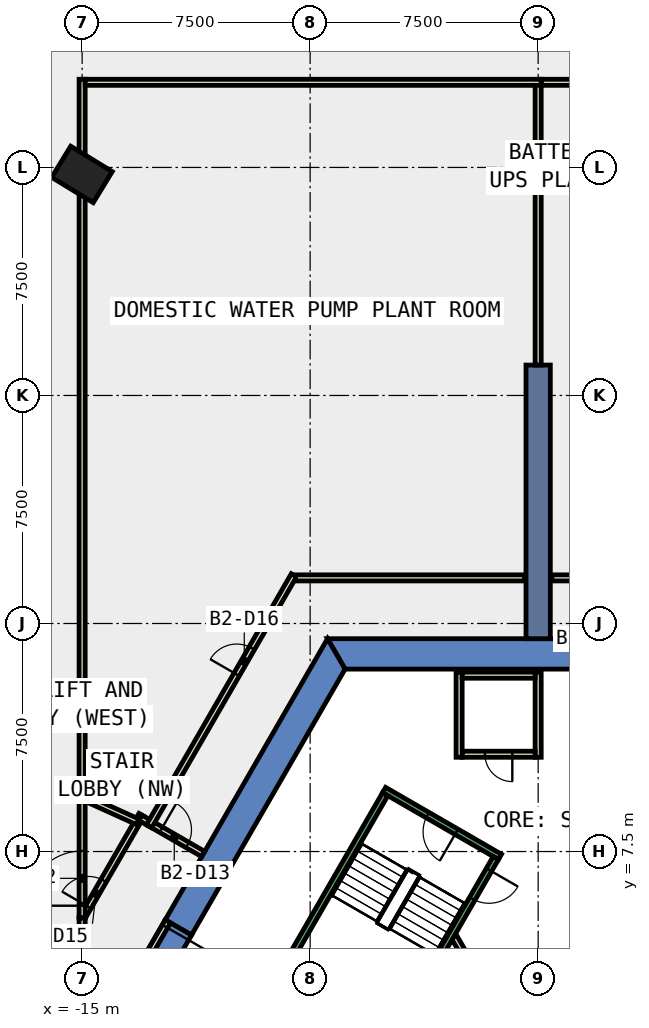
"""IFC4 building model, lengths in metres.
Left out: names, types, materials, properties, quantities, classifications, styles, units other than length and angle.
Written with IfcOpenShell. Run it as: python <this file> out.ifc"""

import sys

from ifc_helpers import new_model, si_unit, direction, frame, frame_2d, origin, origin_2d, place, context, subcontext, project, spatial, polyline, rectangle, outline, extrude, element, fill, save


model = new_model("IFC4")
c1 = context("Model", 3, precision=1e-05, world=origin(), true_north=direction((0.0, 1.0)))
c2 = subcontext(c1, "Body", "Model", "MODEL_VIEW")
j1 = project(units=[si_unit("LENGTHUNIT", "METRE"), si_unit("PLANEANGLEUNIT", "RADIAN")], contexts=[c1])
p1 = place(None, origin())
s1 = spatial("IfcSite", under=j1, at=p1, CompositionType="ELEMENT")
p2 = place(p1, origin())
s2 = spatial("IfcBuilding", under=s1, at=p2, CompositionType="ELEMENT")
p3 = place(p2, frame((0.0, 0.0, -11.0)))
s3 = spatial("IfcBuildingStorey", under=s2, at=p3, CompositionType="ELEMENT", Elevation=-11.0)
p4 = place(p3, frame((-15.005, 29.769, -0.42), z_axis=(0.0, 0.0, 1.0), x_axis=(0.521545830745, 0.853223268806, 0.0)))
e1 = element("IfcColumn", 1, at=p4, inside=s3, PredefinedType="COLUMN", context=c2, shape_type="SweptSolid", body=[
    extrude(rectangle(XDim=1.2, YDim=1.6, at=origin_2d()), origin(), (0.0, 0.0, 1.0), 5.5),
])
p5 = place(p3, frame((0.0, 0.0, -0.42)))
e2 = element("IfcWall", 2, at=p5, inside=s3, PredefinedType="SHEAR", context=c2, shape_type="SweptSolid", body=[
    extrude(outline(polyline([(6.928, 14.5), (-6.928, 14.5), (-6.351, 13.5), (6.351, 13.5), (6.928, 14.5)])), origin(), (0.0, 0.0, 1.0), 5.5),
])
p6 = place(p3, frame((0.0, 0.0, -0.42)))
e3 = element("IfcWall", 3, at=p6, inside=s3, PredefinedType="SHEAR", context=c2, shape_type="SweptSolid", body=[
    extrude(outline(polyline([(-12.267, 5.252), (-11.402, 4.752), (-6.351, 13.5), (-6.928, 14.5), (-12.267, 5.252)])), origin(), (0.0, 0.0, 1.0), 5.5),
])
p7 = place(p3, frame((0.0, 0.0, 3.6)))
e4 = element("IfcWall", 4, at=p7, inside=s3, PredefinedType="SHEAR", context=c2, shape_type="SweptSolid", body=[
    extrude(outline(polyline([(-13.267, 3.52), (-12.402, 3.02), (-11.402, 4.752), (-12.267, 5.252), (-13.267, 3.52)])), origin(), (0.0, 0.0, 1.0), 1.48),
])
p8 = place(p3, frame((0.0, 14.5, -0.42), z_axis=(0.0, 0.0, 1.0), x_axis=(0.0, 1.0, 0.0)))
e5 = element("IfcWall", 5, at=p8, inside=s3, PredefinedType="SHEAR", context=c2, shape_type="SweptSolid", body=[
    extrude(rectangle(XDim=9.0, YDim=0.8, at=frame_2d((4.5, 0.0))), origin(), (0.0, 0.0, 1.0), 5.5),
])
p9 = place(p3, frame((0.45, 16.5, 0.0), z_axis=(0.0, 0.0, 1.0), x_axis=(1.0, 0.0, 0.0)))
e6 = element("IfcWall", 6, at=p9, inside=s3, PredefinedType="PARTITIONING", context=c2, shape_type="SweptSolid", body=[
    extrude(rectangle(XDim=2.222, YDim=0.2, at=frame_2d((1.111, 0.0))), origin(), (0.0, 0.0, 1.0), 5.05),
])
p10 = place(p9, frame((0.792, 0.0, 0.0)))
e7 = element("IfcOpeningElement", 7, at=p10, cuts=e6, PredefinedType="OPENING", context=c2, shape_type="SweptSolid", body=[
    extrude(rectangle(XDim=1.0, YDim=2.1, at=frame_2d((0.5, 1.05))), frame((0.0, 0.11, 0.0), z_axis=(0.0, -1.0, 0.0), x_axis=(1.0, 0.0, 0.0)), (0.0, 0.0, 1.0), 0.22),
])
p11 = place(p3, frame((0.0, 23.5, 0.0), z_axis=(0.0, 0.0, 1.0), x_axis=(0.0, 1.0, 0.0)))
e8 = element("IfcWall", 8, at=p11, inside=s3, PredefinedType="PARTITIONING", context=c2, shape_type="SweptSolid", body=[
    extrude(rectangle(XDim=9.3, YDim=0.2, at=frame_2d((4.65, 0.0))), origin(), (0.0, 0.0, 1.0), 5.05),
])
p12 = place(p3, frame((0.1, 32.8, 0.0), z_axis=(0.0, 0.0, 1.0), x_axis=(1.0, 0.0, 0.0)))
e9 = element("IfcWall", 9, at=p12, inside=s3, PredefinedType="PARTITIONING", context=c2, shape_type="SweptSolid", body=[
    extrude(rectangle(XDim=5.8, YDim=0.2, at=frame_2d((2.9, 0.0))), origin(), (0.0, 0.0, 1.0), 5.05),
])
p13 = place(p3, frame((-12.749, 8.417, 0.0), z_axis=(0.0, 0.0, 1.0), x_axis=(0.866010750942, -0.50002537861, 0.0)))
e10 = element("IfcWall", 10, at=p13, inside=s3, PredefinedType="PARTITIONING", context=c2, shape_type="SweptSolid", body=[
    extrude(rectangle(XDim=2.0, YDim=0.2, at=frame_2d((1.0, 0.0))), origin(), (0.0, 0.0, 1.0), 5.05),
])
p14 = place(p13, frame((0.4, 0.0, 0.0)))
e11 = element("IfcOpeningElement", 11, at=p14, cuts=e10, PredefinedType="OPENING", context=c2, shape_type="SweptSolid", body=[
    extrude(rectangle(XDim=1.0, YDim=2.1, at=frame_2d((0.5, 1.05))), frame((0.0, 0.11, 0.0), z_axis=(0.0, -1.0, 0.0), x_axis=(1.0, 0.0, 0.0)), (0.0, 0.0, 1.0), 0.22),
])
p15 = place(p3, frame((-15.0, 5.318, 0.0), z_axis=(0.0, 0.0, 1.0), x_axis=(0.500034145141, 0.866005689181, 0.0)))
e12 = element("IfcWall", 12, at=p15, inside=s3, PredefinedType="PARTITIONING", context=c2, shape_type="SweptSolid", body=[
    extrude(rectangle(XDim=3.91, YDim=0.2, at=frame_2d((1.955, 0.0))), origin(), (0.0, 0.0, 1.0), 5.05),
])
p16 = place(p15, frame((0.418, 0.0, 0.0)))
e13 = element("IfcOpeningElement", 13, at=p16, cuts=e12, PredefinedType="OPENING", context=c2, shape_type="SweptSolid", body=[
    extrude(rectangle(XDim=1.0, YDim=2.1, at=frame_2d((0.5, 1.05))), frame((0.0, 0.11, 0.0), z_axis=(0.0, -1.0, 0.0), x_axis=(1.0, 0.0, 0.0)), (0.0, 0.0, 1.0), 0.22),
])
p17 = place(p3, frame((-13.082, 8.609, 0.0), z_axis=(0.0, 0.0, 1.0), x_axis=(0.865998573537, -0.500046468473, 0.0)))
e14 = element("IfcWall", 14, at=p17, inside=s3, PredefinedType="PARTITIONING", context=c2, shape_type="SweptSolid", body=[
    extrude(rectangle(XDim=0.37, YDim=0.2, at=frame_2d((0.185, 0.0))), origin(), (0.0, 0.0, 1.0), 5.05),
])
p18 = place(p3, frame((-15.0, 1.534, 0.0), z_axis=(0.0, 0.0, 1.0), x_axis=(0.0, 1.0, 0.0)))
e15 = element("IfcWall", 15, at=p18, inside=s3, PredefinedType="PARTITIONING", context=c2, shape_type="SweptSolid", body=[
    extrude(rectangle(XDim=3.784, YDim=0.2, at=frame_2d((1.892, 0.0))), origin(), (0.0, 0.0, 1.0), 5.05),
])
p19 = place(p3, frame((-12.799, 8.33, 0.0), z_axis=(0.0, 0.0, 1.0), x_axis=(0.499923440311, 0.86606960103, 0.0)))
e16 = element("IfcWall", 16, at=p19, inside=s3, PredefinedType="PARTITIONING", context=c2, shape_type="SweptSolid", body=[
    extrude(rectangle(XDim=9.534, YDim=0.2, at=frame_2d((4.767, 0.0))), origin(), (0.0, 0.0, 1.0), 5.05),
])
p20 = place(p19, frame((5.766, 0.0, 0.0)))
e17 = element("IfcOpeningElement", 17, at=p20, cuts=e16, PredefinedType="OPENING", context=c2, shape_type="SweptSolid", body=[
    extrude(rectangle(XDim=1.0, YDim=2.1, at=frame_2d((0.5, 1.05))), frame((0.0, 0.11, 0.0), z_axis=(0.0, -1.0, 0.0), x_axis=(1.0, 0.0, 0.0)), (0.0, 0.0, 1.0), 0.22),
])
p21 = place(p3, frame((-7.983, 16.5, 0.0), z_axis=(0.0, 0.0, 1.0), x_axis=(1.0, 0.0, 0.0)))
e18 = element("IfcWall", 18, at=p21, inside=s3, PredefinedType="PARTITIONING", context=c2, shape_type="SweptSolid", body=[
    extrude(rectangle(XDim=7.533, YDim=0.2, at=frame_2d((3.767, 0.0))), origin(), (0.0, 0.0, 1.0), 5.05),
])
p22 = place(p3, frame((-14.909, 9.264, 0.0), z_axis=(0.0, 0.0, 1.0), x_axis=(0.910722060418, -0.41301976789, 0.0)))
e19 = element("IfcWall", 19, at=p22, inside=s3, PredefinedType="PARTITIONING", context=c2, shape_type="SweptSolid", body=[
    extrude(rectangle(XDim=1.903, YDim=0.2, at=frame_2d((0.951, 0.0))), origin(), (0.0, 0.0, 1.0), 5.05),
])
p23 = place(p3, frame((-15.0, 5.318, 0.0), z_axis=(0.0, 0.0, 1.0), x_axis=(0.0, 1.0, 0.0)))
e20 = element("IfcWall", 20, at=p23, inside=s3, PredefinedType="PARTITIONING", context=c2, shape_type="SweptSolid", body=[
    extrude(rectangle(XDim=4.087, YDim=0.2, at=frame_2d((2.043, 0.0))), origin(), (0.0, 0.0, 1.0), 5.05),
])
p24 = place(p23, frame((0.4, 0.0, 0.0)))
e21 = element("IfcOpeningElement", 21, at=p24, cuts=e20, PredefinedType="OPENING", context=c2, shape_type="SweptSolid", body=[
    extrude(rectangle(XDim=1.8, YDim=2.1, at=frame_2d((0.9, 1.05))), frame((0.0, 0.11, 0.0), z_axis=(0.0, -1.0, 0.0), x_axis=(1.0, 0.0, 0.0)), (0.0, 0.0, 1.0), 0.22),
])
p25 = place(p3, frame((-15.0, 9.405, 0.0), z_axis=(0.0, 0.0, 1.0), x_axis=(0.0, 1.0, 0.0)))
e22 = element("IfcWall", 22, at=p25, inside=s3, PredefinedType="PARTITIONING", context=c2, shape_type="SweptSolid", body=[
    extrude(rectangle(XDim=23.495, YDim=0.2, at=frame_2d((11.748, 0.0))), origin(), (0.0, 0.0, 1.0), 5.05),
])
p26 = place(p3, frame((-14.9, 32.8, 0.0), z_axis=(0.0, 0.0, 1.0), x_axis=(1.0, 0.0, 0.0)))
e23 = element("IfcWall", 23, at=p26, inside=s3, PredefinedType="PARTITIONING", context=c2, shape_type="SweptSolid", body=[
    extrude(rectangle(XDim=15.0, YDim=0.2, at=frame_2d((7.5, 0.0))), origin(), (0.0, 0.0, 1.0), 5.05),
])
p27 = place(p3, frame((0.0, 13.4, 0.0), z_axis=(0.0, 0.0, 1.0), x_axis=(0.0, -1.0, 0.0)))
e24 = element("IfcWall", 24, at=p27, inside=s3, PredefinedType="PARTITIONING", context=c2, shape_type="SweptSolid", body=[
    extrude(rectangle(XDim=2.8, YDim=0.2, at=frame_2d((1.4, 0.0))), origin(), (0.0, 0.0, 1.0), 5.05),
])
p28 = place(p3, frame((-0.1, 10.7, 0.0), z_axis=(0.0, 0.0, 1.0), x_axis=(-1.0, 0.0, 0.0)))
e25 = element("IfcWall", 25, at=p28, inside=s3, PredefinedType="PARTITIONING", context=c2, shape_type="SweptSolid", body=[
    extrude(rectangle(XDim=2.4, YDim=0.2, at=frame_2d((1.2, 0.0))), origin(), (0.0, 0.0, 1.0), 5.05),
])
p29 = place(p28, frame((0.75, 0.0, 0.0)))
e26 = element("IfcOpeningElement", 26, at=p29, cuts=e25, PredefinedType="OPENING", context=c2, shape_type="SweptSolid", body=[
    extrude(rectangle(XDim=0.9, YDim=2.1, at=frame_2d((0.45, 1.05))), frame((0.0, 0.11, 0.0), z_axis=(0.0, -1.0, 0.0), x_axis=(1.0, 0.0, 0.0)), (0.0, 0.0, 1.0), 0.22),
])
p30 = place(p3, frame((-2.6, 10.6, 0.0), z_axis=(0.0, 0.0, 1.0), x_axis=(0.0, 1.0, 0.0)))
e27 = element("IfcWall", 27, at=p30, inside=s3, PredefinedType="PARTITIONING", context=c2, shape_type="SweptSolid", body=[
    extrude(rectangle(XDim=2.8, YDim=0.2, at=frame_2d((1.4, 0.0))), origin(), (0.0, 0.0, 1.0), 5.05),
])
p31 = place(p3, frame((-2.5, 13.3, 0.0), z_axis=(0.0, 0.0, 1.0), x_axis=(1.0, 0.0, 0.0)))
e28 = element("IfcWall", 28, at=p31, inside=s3, PredefinedType="PARTITIONING", context=c2, shape_type="SweptSolid", body=[
    extrude(rectangle(XDim=2.4, YDim=0.2, at=frame_2d((1.2, 0.0))), origin(), (0.0, 0.0, 1.0), 5.05),
])
p32 = place(p3, frame((-2.771, 4.7, 0.0), z_axis=(0.0, 0.0, 1.0), x_axis=(0.499969479948, -0.866043023828, 0.0)))
e29 = element("IfcWall", 29, at=p32, inside=s3, PredefinedType="PARTITIONING", context=c2, shape_type="SweptSolid", body=[
    extrude(rectangle(XDim=4.99, YDim=0.2, at=frame_2d((2.495, 0.0))), origin(), (0.0, 0.0, 1.0), 5.05),
])
p33 = place(p32, frame((1.945, 0.0, 0.0)))
e30 = element("IfcOpeningElement", 30, at=p33, cuts=e29, PredefinedType="OPENING", context=c2, shape_type="SweptSolid", body=[
    extrude(rectangle(XDim=1.0, YDim=2.1, at=frame_2d((0.5, 1.05))), frame((0.0, 0.11, 0.0), z_axis=(0.0, -1.0, 0.0), x_axis=(1.0, 0.0, 0.0)), (0.0, 0.0, 1.0), 0.22),
])
p34 = place(p3, frame((-12.18, 5.202, 0.0), z_axis=(0.0, 0.0, 1.0), x_axis=(-0.50002537861, -0.866010750942, 0.0)))
e31 = element("IfcWall", 31, at=p34, inside=s3, PredefinedType="PARTITIONING", context=c2, shape_type="SweptSolid", body=[
    extrude(rectangle(XDim=2.0, YDim=0.2, at=frame_2d((1.0, 0.0))), origin(), (0.0, 0.0, 1.0), 2.4),
])
p35 = place(p34, frame((0.19, 0.0, 0.0)))
e32 = element("IfcOpeningElement", 32, at=p35, cuts=e31, PredefinedType="OPENING", context=c2, shape_type="SweptSolid", body=[
    extrude(rectangle(XDim=1.8, YDim=2.1, at=frame_2d((0.9, 1.05))), frame((0.0, 0.11, 0.0), z_axis=(0.0, -1.0, 0.0), x_axis=(1.0, 0.0, 0.0)), (0.0, 0.0, 1.0), 0.22),
])
p36 = place(p3, frame((-1.256, 7.324, 0.0), z_axis=(0.0, 0.0, 1.0), x_axis=(-0.866046073146, 0.499964197906, 0.0)))
e33 = element("IfcWall", 33, at=p36, inside=s3, PredefinedType="STANDARD", context=c2, shape_type="SweptSolid", body=[
    extrude(rectangle(XDim=4.4, YDim=0.2, at=frame_2d((2.2, 0.0))), origin(), (0.0, 0.0, 1.0), 5.05),
])
p37 = place(p36, frame((1.65, 0.0, 0.0)))
e34 = element("IfcOpeningElement", 34, at=p37, cuts=e33, PredefinedType="OPENING", context=c2, shape_type="SweptSolid", body=[
    extrude(rectangle(XDim=1.1, YDim=2.2, at=frame_2d((0.55, 1.1))), frame((0.0, 0.11, 0.0), z_axis=(0.0, -1.0, 0.0), x_axis=(1.0, 0.0, 0.0)), (0.0, 0.0, 1.0), 0.22),
])
p38 = place(p3, frame((-1.393, 7.288, 0.0), z_axis=(0.0, 0.0, 1.0), x_axis=(-0.499963383562, -0.866046543262, 0.0)))
e35 = element("IfcWall", 35, at=p38, inside=s3, PredefinedType="STANDARD", context=c2, shape_type="SweptSolid", body=[
    extrude(rectangle(XDim=6.9, YDim=0.2, at=frame_2d((3.45, 0.0))), origin(), (0.0, 0.0, 1.0), 5.05),
])
p39 = place(p38, frame((0.45, 0.0, 0.0)))
e36 = element("IfcOpeningElement", 36, at=p39, cuts=e35, PredefinedType="OPENING", context=c2, shape_type="SweptSolid", body=[
    extrude(rectangle(XDim=1.1, YDim=2.2, at=frame_2d((0.55, 1.1))), frame((0.0, 0.11, 0.0), z_axis=(0.0, -1.0, 0.0), x_axis=(1.0, 0.0, 0.0)), (0.0, 0.0, 1.0), 0.22),
])
p40 = place(p3, frame((-5.03, 9.388, 0.0), z_axis=(0.0, 0.0, 1.0), x_axis=(-0.499978703459, -0.866037698999, 0.0)))
e37 = element("IfcWall", 37, at=p40, inside=s3, PredefinedType="STANDARD", context=c2, shape_type="SweptSolid", body=[
    extrude(rectangle(XDim=6.9, YDim=0.2, at=frame_2d((3.45, 0.0))), origin(), (0.0, 0.0, 1.0), 5.05),
])
p41 = place(p14, origin())
e38 = element("IfcDoor", 38, at=p41, inside=s3, OperationType="SINGLE_SWING_LEFT", PredefinedType="DOOR", context=c2, shape_type="SweptSolid", body=[
    extrude(rectangle(XDim=1.0, YDim=2.1, at=frame_2d((0.5, 1.05))), frame((0.0, 0.025, 0.0), z_axis=(0.0, -1.0, 0.0), x_axis=(1.0, 0.0, 0.0)), (0.0, 0.0, 1.0), 0.05),
])
fill(e11, e38)
p42 = place(p16, origin())
e39 = element("IfcDoor", 39, at=p42, inside=s3, OperationType="SINGLE_SWING_LEFT", PredefinedType="DOOR", context=c2, shape_type="SweptSolid", body=[
    extrude(rectangle(XDim=1.0, YDim=2.1, at=frame_2d((0.5, 1.05))), frame((0.0, 0.025, 0.0), z_axis=(0.0, -1.0, 0.0), x_axis=(1.0, 0.0, 0.0)), (0.0, 0.0, 1.0), 0.05),
])
fill(e13, e39)
p43 = place(p20, origin())
e40 = element("IfcDoor", 40, at=p43, inside=s3, OperationType="SINGLE_SWING_RIGHT", PredefinedType="DOOR", context=c2, shape_type="SweptSolid", body=[
    extrude(rectangle(XDim=1.0, YDim=2.1, at=frame_2d((0.5, 1.05))), frame((0.0, 0.025, 0.0), z_axis=(0.0, -1.0, 0.0), x_axis=(1.0, 0.0, 0.0)), (0.0, 0.0, 1.0), 0.05),
])
fill(e17, e40)
p44 = place(p24, origin())
e41 = element("IfcDoor", 41, at=p44, inside=s3, OperationType="DOUBLE_DOOR_SINGLE_SWING", PredefinedType="DOOR", context=c2, shape_type="SweptSolid", body=[
    extrude(rectangle(XDim=1.8, YDim=2.1, at=frame_2d((0.9, 1.05))), frame((0.0, 0.025, 0.0), z_axis=(0.0, -1.0, 0.0), x_axis=(1.0, 0.0, 0.0)), (0.0, 0.0, 1.0), 0.05),
])
fill(e21, e41)
p45 = place(p29, origin())
e42 = element("IfcDoor", 42, at=p45, inside=s3, OperationType="SINGLE_SWING_RIGHT", PredefinedType="DOOR", context=c2, shape_type="SweptSolid", body=[
    extrude(rectangle(XDim=0.9, YDim=2.1, at=frame_2d((0.45, 1.05))), frame((0.0, 0.025, 0.0), z_axis=(0.0, -1.0, 0.0), x_axis=(1.0, 0.0, 0.0)), (0.0, 0.0, 1.0), 0.05),
])
fill(e26, e42)
p46 = place(p35, origin())
e43 = element("IfcDoor", 43, at=p46, inside=s3, OperationType="DOUBLE_DOOR_SINGLE_SWING", PredefinedType="DOOR", context=c2, shape_type="SweptSolid", body=[
    extrude(rectangle(XDim=1.8, YDim=2.1, at=frame_2d((0.9, 1.05))), frame((0.0, 0.025, 0.0), z_axis=(0.0, -1.0, 0.0), x_axis=(1.0, 0.0, 0.0)), (0.0, 0.0, 1.0), 0.05),
])
fill(e32, e43)
p47 = place(p39, origin())
e44 = element("IfcDoor", 44, at=p47, inside=s3, OperationType="SINGLE_SWING_LEFT", PredefinedType="DOOR", context=c2, shape_type="SweptSolid", body=[
    extrude(rectangle(XDim=1.1, YDim=2.2, at=frame_2d((0.55, 1.1))), frame((0.0, 0.025, 0.0), z_axis=(0.0, -1.0, 0.0), x_axis=(1.0, 0.0, 0.0)), (0.0, 0.0, 1.0), 0.05),
])
fill(e36, e44)
p48 = place(p37, origin())
e45 = element("IfcDoor", 45, at=p48, inside=s3, OperationType="SINGLE_SWING_LEFT", PredefinedType="DOOR", context=c2, shape_type="SweptSolid", body=[
    extrude(rectangle(XDim=1.1, YDim=2.2, at=frame_2d((0.55, 1.1))), frame((0.0, 0.025, 0.0), z_axis=(0.0, -1.0, 0.0), x_axis=(1.0, 0.0, 0.0)), (0.0, 0.0, 1.0), 0.05),
])
fill(e34, e45)
save(model, sys.argv[1])
